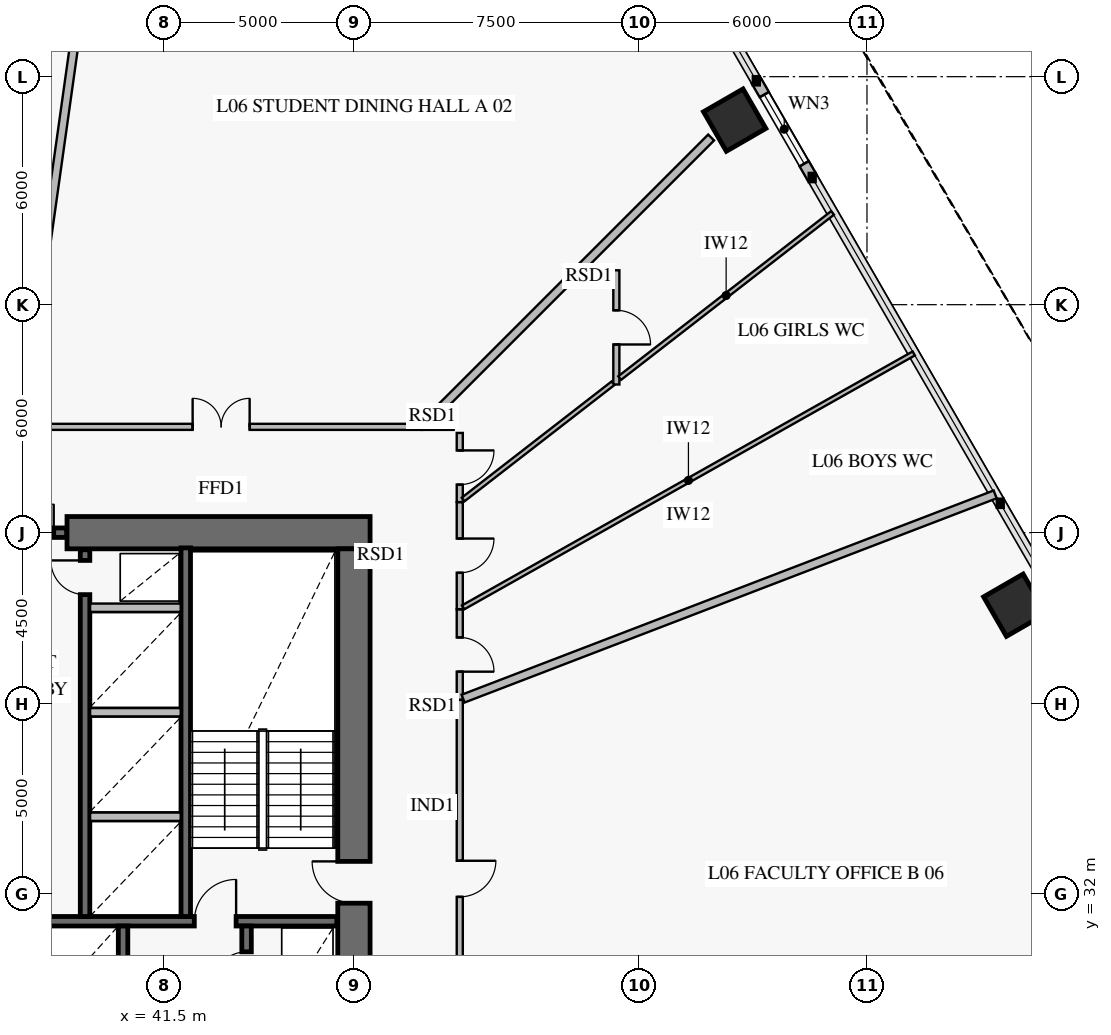
"""IFC4 building model, lengths in metres.
Left out: names, types, materials, properties, quantities, classifications, styles, units other than length and angle.
Written with IfcOpenShell. Run it as: python <this file> out.ifc"""

import sys

from ifc_helpers import new_model, si_unit, direction, frame, frame_2d, origin, origin_2d, place, context, subcontext, project, spatial, rectangle, extrude, element, fill, save


model = new_model("IFC4")
c1 = context("Model", 3, precision=1e-05, world=origin(), true_north=direction((0.0, 1.0)))
c2 = subcontext(c1, "Body", "Model", "MODEL_VIEW")
j1 = project(units=[si_unit("LENGTHUNIT", "METRE"), si_unit("PLANEANGLEUNIT", "RADIAN")], contexts=[c1])
p1 = place(None, origin())
s1 = spatial("IfcSite", under=j1, at=p1, CompositionType="ELEMENT")
p2 = place(p1, origin())
s2 = spatial("IfcBuilding", under=s1, at=p2, CompositionType="ELEMENT")
p3 = place(p2, frame((0.0, 0.0, 24.6)))
s3 = spatial("IfcBuildingStorey", under=s2, at=p3, CompositionType="ELEMENT", Elevation=24.6)
p4 = place(p3, frame((46.925, 41.5, 0.0), z_axis=(0.0, 0.0, 1.0), x_axis=(-1.0, 0.0, 0.0)))
e1 = element("IfcWall", 1, at=p4, inside=s3, PredefinedType="SHEAR", context=c2, shape_type="SweptSolid", body=[
    extrude(rectangle(XDim=7.975, YDim=0.85, at=frame_2d((3.988, 0.0))), origin(), (0.0, 0.0, 1.0), 4.2),
])
p5 = place(p3, frame((46.5, 22.925, 0.0), z_axis=(0.0, 0.0, 1.0), x_axis=(0.0, 1.0, 0.0)))
e2 = element("IfcWall", 2, at=p5, inside=s3, PredefinedType="SHEAR", context=c2, shape_type="SweptSolid", body=[
    extrude(rectangle(XDim=18.15, YDim=0.85, at=frame_2d((9.075, 0.0))), origin(), (0.0, 0.0, 1.0), 4.2),
])
p6 = place(p5, frame((8.825, 0.0, 0.0)))
e3 = element("IfcOpeningElement", 3, at=p6, cuts=e2, PredefinedType="OPENING", context=c2, shape_type="SweptSolid", body=[
    extrude(rectangle(XDim=1.1, YDim=2.15, at=frame_2d((0.55, 1.075))), frame((0.0, 0.437, 0.0), z_axis=(0.0, -1.0, 0.0), x_axis=(1.0, 0.0, 0.0)), (0.0, 0.0, 1.0), 0.874),
])
for number, where, z_axis, x_axis in (
    (4, (63.889, 39.592, 0.0), (0.0, 0.0, 1.0), (-0.5, 0.866, 0.0)),
    (5, (56.519, 52.357, 0.0), (0.0, 0.0, 1.0), (-0.5, 0.866, 0.0)),
):
    element("IfcColumn", number, at=place(p3, frame(where, z_axis=z_axis, x_axis=x_axis)), inside=s3, PredefinedType="COLUMN", context=c2, shape_type="SweptSolid", body=[
        extrude(rectangle(XDim=1.2, YDim=1.2, at=origin_2d()), origin(), (0.0, 0.0, 1.0), 3.92),
    ])
p7 = place(p3, frame((57.088, 53.392, 0.0), z_axis=(0.0, 0.0, 1.0), x_axis=(0.500024377727, -0.866011328839, 0.0)))
e6 = element("IfcWall", 6, at=p7, inside=s3, PredefinedType="SOLIDWALL", context=c2, shape_type="SweptSolid", body=[
    extrude(rectangle(XDim=2.94, YDim=0.28, at=frame_2d((1.47, 0.0))), origin(), (0.0, 0.0, 1.0), 3.92),
])
p8 = place(p7, frame((0.42, 0.0, 0.7)))
e7 = element("IfcOpeningElement", 7, at=p8, cuts=e6, PredefinedType="OPENING", context=c2, shape_type="SweptSolid", body=[
    extrude(rectangle(XDim=2.1, YDim=1.5, at=frame_2d((1.05, 0.75))), frame((0.0, 0.152, 0.0), z_axis=(0.0, -1.0, 0.0), x_axis=(1.0, 0.0, 0.0)), (0.0, 0.0, 1.0), 0.304),
])
p9 = place(p3, frame((36.76, 41.5, 0.0), z_axis=(0.0, 0.0, 1.0), x_axis=(1.0, 0.0, 0.0)))
e8 = element("IfcWall", 8, at=p9, inside=s3, PredefinedType="SOLIDWALL", context=c2, shape_type="SweptSolid", body=[
    extrude(rectangle(XDim=2.18, YDim=0.25, at=frame_2d((1.09, 0.0))), origin(), (0.0, 0.0, 1.0), 4.2),
])
p10 = place(p9, frame((0.34, 0.0, 0.0)))
e9 = element("IfcOpeningElement", 9, at=p10, cuts=e8, PredefinedType="OPENING", context=c2, shape_type="SweptSolid", body=[
    extrude(rectangle(XDim=1.5, YDim=2.15, at=frame_2d((0.75, 1.075))), frame((0.0, 0.137, 0.0), z_axis=(0.0, -1.0, 0.0), x_axis=(1.0, 0.0, 0.0)), (0.0, 0.0, 1.0), 0.274),
])
p11 = place(p3, frame((25.95, 31.275, 0.0), z_axis=(0.0, 0.0, 1.0), x_axis=(1.0, 0.0, 0.0)))
e10 = element("IfcWall", 10, at=p11, inside=s3, PredefinedType="SOLIDWALL", context=c2, shape_type="SweptSolid", body=[
    extrude(rectangle(XDim=20.1, YDim=0.25, at=frame_2d((10.05, 0.0))), origin(), (0.0, 0.0, 1.0), 4.2),
])
p12 = place(p11, frame((2.6, 0.0, 0.0)))
e11 = element("IfcOpeningElement", 11, at=p12, cuts=e10, PredefinedType="OPENING", context=c2, shape_type="SweptSolid", body=[
    extrude(rectangle(XDim=1.1, YDim=2.15, at=frame_2d((0.55, 1.075))), frame((0.0, 0.137, 0.0), z_axis=(0.0, -1.0, 0.0), x_axis=(1.0, 0.0, 0.0)), (0.0, 0.0, 1.0), 0.274),
])
p13 = place(p11, frame((10.6, 0.0, 0.0)))
e12 = element("IfcOpeningElement", 12, at=p13, cuts=e10, PredefinedType="OPENING", context=c2, shape_type="SweptSolid", body=[
    extrude(rectangle(XDim=1.1, YDim=2.15, at=frame_2d((0.55, 1.075))), frame((0.0, 0.137, 0.0), z_axis=(0.0, -1.0, 0.0), x_axis=(1.0, 0.0, 0.0)), (0.0, 0.0, 1.0), 0.274),
])
p14 = place(p11, frame((16.35, 0.0, 0.0)))
e13 = element("IfcOpeningElement", 13, at=p14, cuts=e10, PredefinedType="OPENING", context=c2, shape_type="SweptSolid", body=[
    extrude(rectangle(XDim=1.1, YDim=2.15, at=frame_2d((0.55, 1.075))), frame((0.0, 0.137, 0.0), z_axis=(0.0, -1.0, 0.0), x_axis=(1.0, 0.0, 0.0)), (0.0, 0.0, 1.0), 0.274),
])
p15 = place(p3, frame((42.075, 31.4, 0.0), z_axis=(0.0, 0.0, 1.0), x_axis=(0.0, 1.0, 0.0)))
e14 = element("IfcWall", 14, at=p15, inside=s3, PredefinedType="SOLIDWALL", context=c2, shape_type="SweptSolid", body=[
    extrude(rectangle(XDim=9.7, YDim=0.25, at=frame_2d((4.85, 0.0))), origin(), (0.0, 0.0, 1.0), 4.2),
])
p16 = place(p3, frame((39.425, 31.4, 0.0), z_axis=(0.0, 0.0, 1.0), x_axis=(0.0, 1.0, 0.0)))
e15 = element("IfcWall", 15, at=p16, inside=s3, PredefinedType="SOLIDWALL", context=c2, shape_type="SweptSolid", body=[
    extrude(rectangle(XDim=9.65, YDim=0.25, at=frame_2d((4.825, 0.0))), origin(), (0.0, 0.0, 1.0), 4.2),
])
p17 = place(p16, frame((8.47, 0.0, 0.0)))
e16 = element("IfcOpeningElement", 16, at=p17, cuts=e15, PredefinedType="OPENING", context=c2, shape_type="SweptSolid", body=[
    extrude(rectangle(XDim=0.9, YDim=2.1, at=frame_2d((0.45, 1.05))), frame((0.0, 0.137, 0.0), z_axis=(0.0, -1.0, 0.0), x_axis=(1.0, 0.0, 0.0)), (0.0, 0.0, 1.0), 0.274),
])
p18 = place(p3, frame((40.425, 22.95, 0.0), z_axis=(0.0, 0.0, 1.0), x_axis=(0.0, 1.0, 0.0)))
e17 = element("IfcWall", 17, at=p18, inside=s3, PredefinedType="SOLIDWALL", context=c2, shape_type="SweptSolid", body=[
    extrude(rectangle(XDim=8.2, YDim=0.25, at=frame_2d((4.1, 0.0))), origin(), (0.0, 0.0, 1.0), 4.2),
])
p19 = place(p3, frame((43.675, 22.95, 0.0), z_axis=(0.0, 0.0, 1.0), x_axis=(0.0, 1.0, 0.0)))
e18 = element("IfcWall", 18, at=p19, inside=s3, PredefinedType="SOLIDWALL", context=c2, shape_type="SweptSolid", body=[
    extrude(rectangle(XDim=8.2, YDim=0.25, at=frame_2d((4.1, 0.0))), origin(), (0.0, 0.0, 1.0), 4.2),
])
p20 = place(p19, frame((0.75, 0.0, 0.0)))
e19 = element("IfcOpeningElement", 19, at=p20, cuts=e18, PredefinedType="OPENING", context=c2, shape_type="SweptSolid", body=[
    extrude(rectangle(XDim=1.3, YDim=2.3, at=frame_2d((0.65, 1.15))), frame((0.0, 0.137, 0.0), z_axis=(0.0, -1.0, 0.0), x_axis=(1.0, 0.0, 0.0)), (0.0, 0.0, 1.0), 0.274),
])
p21 = place(p19, frame((3.7, 0.0, 0.0)))
e20 = element("IfcOpeningElement", 20, at=p21, cuts=e18, PredefinedType="OPENING", context=c2, shape_type="SweptSolid", body=[
    extrude(rectangle(XDim=1.3, YDim=2.3, at=frame_2d((0.65, 1.15))), frame((0.0, 0.137, 0.0), z_axis=(0.0, -1.0, 0.0), x_axis=(1.0, 0.0, 0.0)), (0.0, 0.0, 1.0), 0.274),
])
p22 = place(p19, frame((6.62, 0.0, 0.0)))
e21 = element("IfcOpeningElement", 21, at=p22, cuts=e18, PredefinedType="OPENING", context=c2, shape_type="SweptSolid", body=[
    extrude(rectangle(XDim=0.9, YDim=2.1, at=frame_2d((0.45, 1.05))), frame((0.0, 0.137, 0.0), z_axis=(0.0, -1.0, 0.0), x_axis=(1.0, 0.0, 0.0)), (0.0, 0.0, 1.0), 0.274),
])
p23 = place(p3, frame((49.285, 37.1, 0.0), z_axis=(0.0, 0.0, 1.0), x_axis=(0.0, 1.0, 0.0)))
e22 = element("IfcWall", 22, at=p23, inside=s3, PredefinedType="PARTITIONING", context=c2, shape_type="SweptSolid", body=[
    extrude(rectangle(XDim=2.386, YDim=0.16, at=frame_2d((1.193, 0.0))), origin(), (0.0, 0.0, 1.0), 3.92),
])
p24 = place(p23, frame((0.743, 0.0, 0.0)))
e23 = element("IfcOpeningElement", 23, at=p24, cuts=e22, PredefinedType="OPENING", context=c2, shape_type="SweptSolid", body=[
    extrude(rectangle(XDim=0.9, YDim=2.1, at=frame_2d((0.45, 1.05))), frame((0.0, 0.092, 0.0), z_axis=(0.0, -1.0, 0.0), x_axis=(1.0, 0.0, 0.0)), (0.0, 0.0, 1.0), 0.184),
])
p25 = place(p3, frame((49.285, 39.486, 0.0), z_axis=(0.0, 0.0, 1.0), x_axis=(0.0, 1.0, 0.0)))
e24 = element("IfcWall", 24, at=p25, inside=s3, PredefinedType="PARTITIONING", context=c2, shape_type="SweptSolid", body=[
    extrude(rectangle(XDim=2.819, YDim=0.16, at=frame_2d((1.41, 0.0))), origin(), (0.0, 0.0, 1.0), 3.92),
])
p26 = place(p25, frame((0.96, 0.0, 0.0)))
e25 = element("IfcOpeningElement", 25, at=p26, cuts=e24, PredefinedType="OPENING", context=c2, shape_type="SweptSolid", body=[
    extrude(rectangle(XDim=0.9, YDim=2.1, at=frame_2d((0.45, 1.05))), frame((0.0, 0.092, 0.0), z_axis=(0.0, -1.0, 0.0), x_axis=(1.0, 0.0, 0.0)), (0.0, 0.0, 1.0), 0.184),
])
p27 = place(p3, frame((53.405, 48.405, 0.0), z_axis=(0.0, 0.0, 1.0), x_axis=(0.0, -1.0, 0.0)))
e26 = element("IfcWall", 26, at=p27, inside=s3, PredefinedType="PARTITIONING", context=c2, shape_type="SweptSolid", body=[
    extrude(rectangle(XDim=3.006, YDim=0.16, at=frame_2d((1.503, 0.0))), origin(), (0.0, 0.0, 1.0), 3.92),
])
p28 = place(p27, frame((1.053, 0.0, 0.0)))
e27 = element("IfcOpeningElement", 27, at=p28, cuts=e26, PredefinedType="OPENING", context=c2, shape_type="SweptSolid", body=[
    extrude(rectangle(XDim=0.9, YDim=2.1, at=frame_2d((0.45, 1.05))), frame((0.0, 0.092, 0.0), z_axis=(0.0, -1.0, 0.0), x_axis=(1.0, 0.0, 0.0)), (0.0, 0.0, 1.0), 0.184),
])
p29 = place(p3, frame((49.285, 42.305, 0.0), z_axis=(0.0, 0.0, 1.0), x_axis=(0.0, 1.0, 0.0)))
e28 = element("IfcWall", 28, at=p29, inside=s3, PredefinedType="PARTITIONING", context=c2, shape_type="SweptSolid", body=[
    extrude(rectangle(XDim=1.82, YDim=0.16, at=frame_2d((0.91, 0.0))), origin(), (0.0, 0.0, 1.0), 3.92),
])
p30 = place(p29, frame((0.46, 0.0, 0.0)))
e29 = element("IfcOpeningElement", 29, at=p30, cuts=e28, PredefinedType="OPENING", context=c2, shape_type="SweptSolid", body=[
    extrude(rectangle(XDim=0.9, YDim=2.1, at=frame_2d((0.45, 1.05))), frame((0.0, 0.092, 0.0), z_axis=(0.0, -1.0, 0.0), x_axis=(1.0, 0.0, 0.0)), (0.0, 0.0, 1.0), 0.184),
])
p31 = place(p3, frame((48.285, 44.285, 0.0), z_axis=(0.0, 0.0, 1.0), x_axis=(-1.0, 0.0, 0.0)))
e30 = element("IfcWall", 30, at=p31, inside=s3, PredefinedType="PARTITIONING", context=c2, shape_type="SweptSolid", body=[
    extrude(rectangle(XDim=10.558, YDim=0.16, at=frame_2d((5.279, 0.0))), origin(), (0.0, 0.0, 1.0), 3.22),
])
p32 = place(p31, frame((4.529, 0.0, 0.0)))
e31 = element("IfcOpeningElement", 31, at=p32, cuts=e30, PredefinedType="OPENING", context=c2, shape_type="SweptSolid", body=[
    extrude(rectangle(XDim=1.5, YDim=2.15, at=frame_2d((0.75, 1.075))), frame((0.0, 0.092, 0.0), z_axis=(0.0, -1.0, 0.0), x_axis=(1.0, 0.0, 0.0)), (0.0, 0.0, 1.0), 0.184),
])
p33 = place(p3, frame((49.285, 27.683, 0.0), z_axis=(0.0, 0.0, 1.0), x_axis=(0.0, 1.0, 0.0)))
e32 = element("IfcWall", 32, at=p33, inside=s3, PredefinedType="PARTITIONING", context=c2, shape_type="SweptSolid", body=[
    extrude(rectangle(XDim=9.416, YDim=0.16, at=frame_2d((4.708, 0.0))), origin(), (0.0, 0.0, 1.0), 3.22),
])
p34 = place(p33, frame((4.233, 0.0, 0.0)))
e33 = element("IfcOpeningElement", 33, at=p34, cuts=e32, PredefinedType="OPENING", context=c2, shape_type="SweptSolid", body=[
    extrude(rectangle(XDim=0.95, YDim=2.1, at=frame_2d((0.475, 1.05))), frame((0.0, 0.092, 0.0), z_axis=(0.0, -1.0, 0.0), x_axis=(1.0, 0.0, 0.0)), (0.0, 0.0, 1.0), 0.184),
])
for number, where, z_axis, x_axis in (
    (34, (39.558, 34.025, 0.0), (0.0, 0.0, 1.0), (1.0, 0.0, 0.0)),
    (35, (39.558, 36.775, 0.0), (0.0, 0.0, 1.0), (1.0, 0.0, 0.0)),
    (36, (39.558, 39.525, 0.0), (0.0, 0.0, 1.0), (1.0, 0.0, 0.0)),
):
    element("IfcWall", number, at=place(p3, frame(where, z_axis=z_axis, x_axis=x_axis)), inside=s3, PredefinedType="PARTITIONING", context=c2, shape_type="SweptSolid", body=[
        extrude(rectangle(XDim=2.384, YDim=0.22, at=frame_2d((1.192, 0.0))), origin(), (0.0, 0.0, 1.0), 3.92),
    ])
p35 = place(p3, frame((49.373, 37.134, 0.0), z_axis=(0.0, 0.0, 1.0), x_axis=(0.933584586871, 0.358357111214, 0.0)))
e37 = element("IfcWall", 37, at=p35, inside=s3, PredefinedType="PARTITIONING", context=c2, shape_type="SweptSolid", body=[
    extrude(rectangle(XDim=14.995, YDim=0.22, at=frame_2d((7.498, 0.0))), origin(), (0.0, 0.0, 1.0), 3.17),
])
p36 = place(p3, frame((49.373, 39.535, 0.0), z_axis=(0.0, 0.0, 1.0), x_axis=(0.871218886354, 0.490894746417, 0.0)))
e38 = element("IfcWall", 38, at=p36, inside=s3, PredefinedType="PARTITIONING", context=c2, shape_type="SweptSolid", body=[
    extrude(rectangle(XDim=13.61, YDim=0.12, at=frame_2d((6.805, 0.0))), origin(), (0.0, 0.0, 1.0), 3.17),
])
p37 = place(p3, frame((49.373, 42.373, 0.0), z_axis=(0.0, 0.0, 1.0), x_axis=(0.790162754328, 0.612897072658, 0.0)))
e39 = element("IfcWall", 39, at=p37, inside=s3, PredefinedType="PARTITIONING", context=c2, shape_type="SweptSolid", body=[
    extrude(rectangle(XDim=4.991, YDim=0.12, at=frame_2d((2.496, 0.0))), origin(), (0.0, 0.0, 1.0), 3.47),
])
p38 = place(p3, frame((53.493, 45.569, 0.0), z_axis=(0.0, 0.0, 1.0), x_axis=(0.79017658067, 0.612879246965, 0.0)))
e40 = element("IfcWall", 40, at=p38, inside=s3, PredefinedType="PARTITIONING", context=c2, shape_type="SweptSolid", body=[
    extrude(rectangle(XDim=7.09, YDim=0.12, at=frame_2d((3.545, 0.0))), origin(), (0.0, 0.0, 1.0), 3.17),
])
p39 = place(p3, frame((52.292, 48.405, 0.0), z_axis=(0.0, 0.0, 1.0), x_axis=(1.0, 0.0, 0.0)))
e41 = element("IfcWall", 41, at=p39, inside=s3, PredefinedType="PARTITIONING", context=c2, shape_type="SweptSolid", body=[
    extrude(rectangle(XDim=1.025, YDim=0.16, at=frame_2d((0.512, 0.0))), origin(), (0.0, 0.0, 1.0), 3.22),
])
p40 = place(p3, frame((49.125, 44.285, 0.0), z_axis=(0.0, 0.0, 1.0), x_axis=(-1.0, 0.0, 0.0)))
e42 = element("IfcWall", 42, at=p40, inside=s3, PredefinedType="PARTITIONING", context=c2, shape_type="SweptSolid", body=[
    extrude(rectangle(XDim=0.84, YDim=0.16, at=frame_2d((0.42, 0.0))), origin(), (0.0, 0.0, 1.0), 3.22),
])
p41 = place(p3, frame((48.373, 44.373, 0.0), z_axis=(0.0, 0.0, 1.0), x_axis=(0.707106781187, 0.707106781187, 0.0)))
e43 = element("IfcWall", 43, at=p41, inside=s3, PredefinedType="PARTITIONING", context=c2, shape_type="SweptSolid", body=[
    extrude(rectangle(XDim=5.577, YDim=0.22, at=frame_2d((2.789, 0.0))), origin(), (0.0, 0.0, 1.0), 3.22),
])
p42 = place(p3, frame((52.493, 48.493, 0.0), z_axis=(0.0, 0.0, 1.0), x_axis=(0.707106781187, 0.707106781187, 0.0)))
e44 = element("IfcWall", 44, at=p42, inside=s3, PredefinedType="PARTITIONING", context=c2, shape_type="SweptSolid", body=[
    extrude(rectangle(XDim=4.817, YDim=0.22, at=frame_2d((2.408, 0.0))), origin(), (0.0, 0.0, 1.0), 3.22),
])
p43 = place(p3, frame((37.739, 44.373, 0.0), z_axis=(0.0, 0.0, 1.0), x_axis=(0.139165938444, 0.990269075341, 0.0)))
e45 = element("IfcWall", 45, at=p43, inside=s3, PredefinedType="PARTITIONING", context=c2, shape_type="SweptSolid", body=[
    extrude(rectangle(XDim=16.749, YDim=0.22, at=frame_2d((8.374, 0.0))), origin(), (0.0, 0.0, 1.0), 3.17),
])
p44 = place(p8, origin())
e46 = element("IfcWindow", 46, at=p44, inside=s3, PartitioningType="SINGLE_PANEL", PredefinedType="WINDOW", context=c2, shape_type="SweptSolid", body=[
    extrude(rectangle(XDim=2.1, YDim=1.5, at=frame_2d((1.05, 0.75))), frame((0.0, 0.03, 0.0), z_axis=(0.0, -1.0, 0.0), x_axis=(1.0, 0.0, 0.0)), (0.0, 0.0, 1.0), 0.06),
])
fill(e7, e46)
p45 = place(p6, origin())
e47 = element("IfcDoor", 47, at=p45, inside=s3, OperationType="SINGLE_SWING_RIGHT", PredefinedType="USERDEFINED", context=c2, shape_type="SweptSolid", body=[
    extrude(rectangle(XDim=1.1, YDim=2.15, at=frame_2d((0.55, 1.075))), frame((0.0, 0.025, 0.0), z_axis=(0.0, -1.0, 0.0), x_axis=(1.0, 0.0, 0.0)), (0.0, 0.0, 1.0), 0.05),
])
fill(e3, e47)
p46 = place(p10, origin())
e48 = element("IfcDoor", 48, at=p46, inside=s3, OperationType="DOUBLE_DOOR_SINGLE_SWING", PredefinedType="DOOR", context=c2, shape_type="SweptSolid", body=[
    extrude(rectangle(XDim=1.5, YDim=2.15, at=frame_2d((0.75, 1.075))), frame((0.0, 0.025, 0.0), z_axis=(0.0, -1.0, 0.0), x_axis=(1.0, 0.0, 0.0)), (0.0, 0.0, 1.0), 0.05),
])
fill(e9, e48)
p47 = place(p14, origin())
e49 = element("IfcDoor", 49, at=p47, inside=s3, OperationType="SINGLE_SWING_RIGHT", PredefinedType="USERDEFINED", context=c2, shape_type="SweptSolid", body=[
    extrude(rectangle(XDim=1.1, YDim=2.15, at=frame_2d((0.55, 1.075))), frame((0.0, 0.025, 0.0), z_axis=(0.0, -1.0, 0.0), x_axis=(1.0, 0.0, 0.0)), (0.0, 0.0, 1.0), 0.05),
])
fill(e13, e49)
p48 = place(p17, origin())
e50 = element("IfcDoor", 50, at=p48, inside=s3, OperationType="SINGLE_SWING_RIGHT", PredefinedType="DOOR", context=c2, shape_type="SweptSolid", body=[
    extrude(rectangle(XDim=0.9, YDim=2.1, at=frame_2d((0.45, 1.05))), frame((0.0, 0.025, 0.0), z_axis=(0.0, -1.0, 0.0), x_axis=(1.0, 0.0, 0.0)), (0.0, 0.0, 1.0), 0.05),
])
fill(e16, e50)
p49 = place(p22, origin())
e51 = element("IfcDoor", 51, at=p49, inside=s3, OperationType="SINGLE_SWING_LEFT", PredefinedType="DOOR", context=c2, shape_type="SweptSolid", body=[
    extrude(rectangle(XDim=0.9, YDim=2.1, at=frame_2d((0.45, 1.05))), frame((0.0, 0.025, 0.0), z_axis=(0.0, -1.0, 0.0), x_axis=(1.0, 0.0, 0.0)), (0.0, 0.0, 1.0), 0.05),
])
fill(e21, e51)
p50 = place(p24, frame((0.9, 0.0, 0.0), z_axis=(0.0, 0.0, 1.0), x_axis=(-1.0, 0.0, 0.0)))
e52 = element("IfcDoor", 52, at=p50, inside=s3, OperationType="SINGLE_SWING_RIGHT", PredefinedType="DOOR", context=c2, shape_type="SweptSolid", body=[
    extrude(rectangle(XDim=0.9, YDim=2.1, at=frame_2d((0.45, 1.05))), frame((0.0, 0.025, 0.0), z_axis=(0.0, -1.0, 0.0), x_axis=(1.0, 0.0, 0.0)), (0.0, 0.0, 1.0), 0.05),
])
fill(e23, e52)
p51 = place(p26, frame((0.9, 0.0, 0.0), z_axis=(0.0, 0.0, 1.0), x_axis=(-1.0, 0.0, 0.0)))
e53 = element("IfcDoor", 53, at=p51, inside=s3, OperationType="SINGLE_SWING_LEFT", PredefinedType="DOOR", context=c2, shape_type="SweptSolid", body=[
    extrude(rectangle(XDim=0.9, YDim=2.1, at=frame_2d((0.45, 1.05))), frame((0.0, 0.025, 0.0), z_axis=(0.0, -1.0, 0.0), x_axis=(1.0, 0.0, 0.0)), (0.0, 0.0, 1.0), 0.05),
])
fill(e25, e53)
p52 = place(p28, origin())
e54 = element("IfcDoor", 54, at=p52, inside=s3, OperationType="SINGLE_SWING_RIGHT", PredefinedType="DOOR", context=c2, shape_type="SweptSolid", body=[
    extrude(rectangle(XDim=0.9, YDim=2.1, at=frame_2d((0.45, 1.05))), frame((0.0, 0.025, 0.0), z_axis=(0.0, -1.0, 0.0), x_axis=(1.0, 0.0, 0.0)), (0.0, 0.0, 1.0), 0.05),
])
fill(e27, e54)
p53 = place(p30, frame((0.9, 0.0, 0.0), z_axis=(0.0, 0.0, 1.0), x_axis=(-1.0, 0.0, 0.0)))
e55 = element("IfcDoor", 55, at=p53, inside=s3, OperationType="SINGLE_SWING_LEFT", PredefinedType="DOOR", context=c2, shape_type="SweptSolid", body=[
    extrude(rectangle(XDim=0.9, YDim=2.1, at=frame_2d((0.45, 1.05))), frame((0.0, 0.025, 0.0), z_axis=(0.0, -1.0, 0.0), x_axis=(1.0, 0.0, 0.0)), (0.0, 0.0, 1.0), 0.05),
])
fill(e29, e55)
p54 = place(p32, frame((1.5, 0.0, 0.0), z_axis=(0.0, 0.0, 1.0), x_axis=(-1.0, 0.0, 0.0)))
e56 = element("IfcDoor", 56, at=p54, inside=s3, OperationType="DOUBLE_DOOR_SINGLE_SWING", PredefinedType="DOOR", context=c2, shape_type="SweptSolid", body=[
    extrude(rectangle(XDim=1.5, YDim=2.15, at=frame_2d((0.75, 1.075))), frame((0.0, 0.025, 0.0), z_axis=(0.0, -1.0, 0.0), x_axis=(1.0, 0.0, 0.0)), (0.0, 0.0, 1.0), 0.05),
])
fill(e31, e56)
p55 = place(p34, frame((0.95, 0.0, 0.0), z_axis=(0.0, 0.0, 1.0), x_axis=(-1.0, 0.0, 0.0)))
e57 = element("IfcDoor", 57, at=p55, inside=s3, OperationType="SINGLE_SWING_LEFT", PredefinedType="DOOR", context=c2, shape_type="SweptSolid", body=[
    extrude(rectangle(XDim=0.95, YDim=2.1, at=frame_2d((0.475, 1.05))), frame((0.0, 0.025, 0.0), z_axis=(0.0, -1.0, 0.0), x_axis=(1.0, 0.0, 0.0)), (0.0, 0.0, 1.0), 0.05),
])
fill(e33, e57)
save(model, sys.argv[1])
